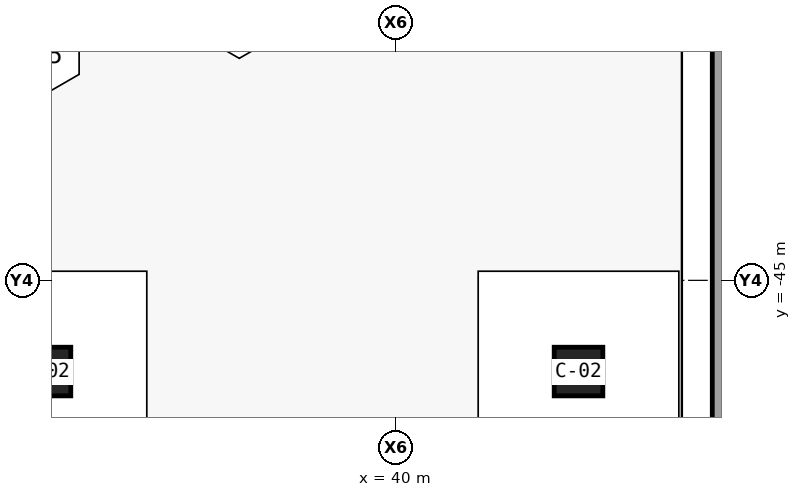
"""IFC4 building model, lengths in metres.
Left out: names, types, materials, properties, quantities, classifications, styles, units other than length and angle.
Written with IfcOpenShell. Run it as: python <this file> out.ifc"""

import sys

from ifc_helpers import new_model, si_unit, direction, frame, origin, origin_2d, place, context, subcontext, project, spatial, polyline, rectangle, outline, extrude, element, save


model = new_model("IFC4")
c1 = context("Model", 3, precision=1e-05, world=origin(), true_north=direction((0.0, 1.0)))
c2 = subcontext(c1, "Body", "Model", "MODEL_VIEW")
j1 = project(units=[si_unit("LENGTHUNIT", "METRE"), si_unit("PLANEANGLEUNIT", "RADIAN")], contexts=[c1])
p1 = place(None, origin())
s1 = spatial("IfcSite", under=j1, at=p1, CompositionType="ELEMENT")
p2 = place(p1, origin())
s2 = spatial("IfcBuilding", under=s1, at=p2, CompositionType="ELEMENT")
p3 = place(p2, frame((0.0, 0.0, -9.0)))
s3 = spatial("IfcBuildingStorey", under=s2, at=p3, CompositionType="ELEMENT", Elevation=-9.0)
p4 = place(p3, frame((50.7, -83.0, 0.0), z_axis=(0.0, 0.0, 1.0), x_axis=(0.0, 1.0, 0.0)))
e1 = element("IfcWall", 1, at=p4, inside=s3, PredefinedType="SOLIDWALL", context=c2, shape_type="SweptSolid", body=[
    extrude(outline(polyline([(0.6, -0.3), (0.6, 0.3), (81.4, 0.3), (82.0, 0.3), (82.0, -0.3), (0.6, -0.3)])), origin(), (0.0, 0.0, 1.0), 4.5),
])
for number, where, z_axis, x_axis in (
    (2, (28.5, -48.0, 0.0), (0.0, 0.0, 1.0), (1.0, 0.0, 0.0)),
    (3, (46.0, -48.0, 0.0), (0.0, 0.0, 1.0), (1.0, 0.0, 0.0)),
):
    element("IfcColumn", number, at=place(p3, frame(where, z_axis=z_axis, x_axis=x_axis)), inside=s3, PredefinedType="COLUMN", context=c2, shape_type="SweptSolid", body=[
        extrude(rectangle(XDim=1.6, YDim=1.6, at=origin_2d()), origin(), (0.0, 0.0, 1.0), 4.5),
    ])
save(model, sys.argv[1])
